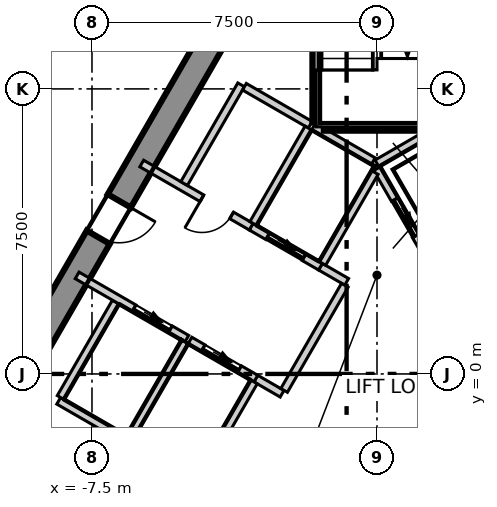
"""IFC4 building model, lengths in metres.
Left out: names, types, materials, properties, quantities, classifications, styles, units other than length and angle.
Written with IfcOpenShell. Run it as: python <this file> out.ifc"""

import sys

from ifc_helpers import new_model, si_unit, direction, frame, frame_2d, origin, place, context, subcontext, project, spatial, polyline, rectangle, outline, extrude, element, fill, save


model = new_model("IFC4")
c1 = context("Model", 3, precision=1e-05, world=origin(), true_north=direction((0.0, 1.0)))
c2 = subcontext(c1, "Body", "Model", "MODEL_VIEW")
j1 = project(units=[si_unit("LENGTHUNIT", "METRE"), si_unit("PLANEANGLEUNIT", "RADIAN")], contexts=[c1])
p1 = place(None, origin())
s1 = spatial("IfcSite", under=j1, at=p1, CompositionType="ELEMENT")
p2 = place(p1, origin())
s2 = spatial("IfcBuilding", under=s1, at=p2, CompositionType="ELEMENT")
p3 = place(p2, frame((0.0, 0.0, 203.3)))
s3 = spatial("IfcBuildingStorey", under=s2, at=p3, CompositionType="ELEMENT", Elevation=203.3)
p4 = place(p3, frame((-1.703, 13.35, -0.3), z_axis=(0.0, 0.0, 1.0), x_axis=(-0.500011533395, -0.866018744874, 0.0)))
e1 = element("IfcWall", 1, at=p4, inside=s3, PredefinedType="SHEAR", context=c2, shape_type="SweptSolid", body=[
    extrude(outline(polyline([(-0.202, -0.35), (1.782, -0.35), (3.766, -0.35), (5.75, -0.35), (7.734, -0.35), (9.718, -0.35), (11.702, -0.35), (13.686, -0.35), (15.67, -0.35), (17.654, -0.35), (19.638, -0.35), (21.622, -0.35), (21.218, 0.35), (19.307, 0.35), (17.397, 0.35), (15.486, 0.35), (13.576, 0.35), (11.665, 0.35), (9.755, 0.35), (7.844, 0.35), (5.934, 0.35), (4.023, 0.35), (2.113, 0.35), (0.202, 0.35), (-0.202, -0.35)])), origin(), (0.0, 0.0, 1.0), 4.0),
])
p5 = place(p4, frame((10.16, 0.0, 0.3)))
e2 = element("IfcOpeningElement", 2, at=p5, cuts=e1, PredefinedType="OPENING", context=c2, shape_type="SweptSolid", body=[
    extrude(rectangle(XDim=1.1, YDim=2.1, at=frame_2d((0.55, 1.05))), frame((0.0, 0.36, 0.0), z_axis=(0.0, -1.0, 0.0), x_axis=(1.0, 0.0, 0.0)), (0.0, 0.0, 1.0), 0.72),
])
p6 = place(p4, frame((4.055, 0.0, 0.3)))
e3 = element("IfcOpeningElement", 3, at=p6, cuts=e1, PredefinedType="OPENING", context=c2, shape_type="SweptSolid", body=[
    extrude(rectangle(XDim=0.9, YDim=2.1, at=frame_2d((0.45, 1.05))), frame((0.0, 0.36, 0.0), z_axis=(0.0, -1.0, 0.0), x_axis=(1.0, 0.0, 0.0)), (0.0, 0.0, 1.0), 0.72),
])
p7 = place(p3, frame((-2.824, 31.513, 0.0), z_axis=(0.0, 0.0, 1.0), x_axis=(-0.500012324412, -0.866018288165, 0.0)))
e4 = element("IfcWall", 4, at=p7, inside=s3, PredefinedType="ELEMENTEDWALL", context=c2, shape_type="SweptSolid", body=[
    extrude(rectangle(XDim=51.739, YDim=0.2, at=frame_2d((25.87, 0.0))), origin(), (0.0, 0.0, 1.0), 3.7),
])
p8 = place(p7, frame((2.275, 0.0, 0.9)))
e5 = element("IfcOpeningElement", 5, at=p8, cuts=e4, PredefinedType="OPENING", context=c2, shape_type="SweptSolid", body=[
    extrude(rectangle(XDim=4.2, YDim=2.5, at=frame_2d((2.1, 1.25))), frame((0.0, 0.11, 0.0), z_axis=(0.0, -1.0, 0.0), x_axis=(1.0, 0.0, 0.0)), (0.0, 0.0, 1.0), 0.22),
])
p9 = place(p7, frame((8.419, 0.0, 0.9)))
e6 = element("IfcOpeningElement", 6, at=p9, cuts=e4, PredefinedType="OPENING", context=c2, shape_type="SweptSolid", body=[
    extrude(rectangle(XDim=4.2, YDim=2.5, at=frame_2d((2.1, 1.25))), frame((0.0, 0.11, 0.0), z_axis=(0.0, -1.0, 0.0), x_axis=(1.0, 0.0, 0.0)), (0.0, 0.0, 1.0), 0.22),
])
p10 = place(p7, frame((14.563, 0.0, 0.9)))
e7 = element("IfcOpeningElement", 7, at=p10, cuts=e4, PredefinedType="OPENING", context=c2, shape_type="SweptSolid", body=[
    extrude(rectangle(XDim=4.2, YDim=2.5, at=frame_2d((2.1, 1.25))), frame((0.0, 0.11, 0.0), z_axis=(0.0, -1.0, 0.0), x_axis=(1.0, 0.0, 0.0)), (0.0, 0.0, 1.0), 0.22),
])
p11 = place(p7, frame((20.707, 0.0, 0.9)))
e8 = element("IfcOpeningElement", 8, at=p11, cuts=e4, PredefinedType="OPENING", context=c2, shape_type="SweptSolid", body=[
    extrude(rectangle(XDim=4.2, YDim=2.5, at=frame_2d((2.1, 1.25))), frame((0.0, 0.11, 0.0), z_axis=(0.0, -1.0, 0.0), x_axis=(1.0, 0.0, 0.0)), (0.0, 0.0, 1.0), 0.22),
])
p12 = place(p7, frame((26.851, 0.0, 0.9)))
e9 = element("IfcOpeningElement", 9, at=p12, cuts=e4, PredefinedType="OPENING", context=c2, shape_type="SweptSolid", body=[
    extrude(rectangle(XDim=4.2, YDim=2.5, at=frame_2d((2.1, 1.25))), frame((0.0, 0.11, 0.0), z_axis=(0.0, -1.0, 0.0), x_axis=(1.0, 0.0, 0.0)), (0.0, 0.0, 1.0), 0.22),
])
p13 = place(p7, frame((32.995, 0.0, 0.9)))
e10 = element("IfcOpeningElement", 10, at=p13, cuts=e4, PredefinedType="OPENING", context=c2, shape_type="SweptSolid", body=[
    extrude(rectangle(XDim=4.2, YDim=2.5, at=frame_2d((2.1, 1.25))), frame((0.0, 0.11, 0.0), z_axis=(0.0, -1.0, 0.0), x_axis=(1.0, 0.0, 0.0)), (0.0, 0.0, 1.0), 0.22),
])
p14 = place(p7, frame((39.14, 0.0, 0.9)))
e11 = element("IfcOpeningElement", 11, at=p14, cuts=e4, PredefinedType="OPENING", context=c2, shape_type="SweptSolid", body=[
    extrude(rectangle(XDim=4.2, YDim=2.5, at=frame_2d((2.1, 1.25))), frame((0.0, 0.11, 0.0), z_axis=(0.0, -1.0, 0.0), x_axis=(1.0, 0.0, 0.0)), (0.0, 0.0, 1.0), 0.22),
])
p15 = place(p7, frame((45.284, 0.0, 0.9)))
e12 = element("IfcOpeningElement", 12, at=p15, cuts=e4, PredefinedType="OPENING", context=c2, shape_type="SweptSolid", body=[
    extrude(rectangle(XDim=4.2, YDim=2.5, at=frame_2d((2.1, 1.25))), frame((0.0, 0.11, 0.0), z_axis=(0.0, -1.0, 0.0), x_axis=(1.0, 0.0, 0.0)), (0.0, 0.0, 1.0), 0.22),
])
p16 = place(p3, frame((-20.883, -11.97, 0.0), z_axis=(0.0, 0.0, 1.0), x_axis=(0.500006150555, 0.866021852731, 0.0)))
e13 = element("IfcWall", 13, at=p16, inside=s3, PredefinedType="PARTITIONING", context=c2, shape_type="SweptSolid", body=[
    extrude(rectangle(XDim=41.766, YDim=0.15, at=frame_2d((20.883, 0.0))), origin(), (0.0, 0.0, 1.0), 3.7),
])
p17 = place(p16, frame((36.916, 0.0, 0.0)))
e14 = element("IfcOpeningElement", 14, at=p17, cuts=e13, PredefinedType="OPENING", context=c2, shape_type="SweptSolid", body=[
    extrude(rectangle(XDim=1.1, YDim=2.1, at=frame_2d((0.55, 1.05))), frame((0.0, 0.085, 0.0), z_axis=(0.0, -1.0, 0.0), x_axis=(1.0, 0.0, 0.0)), (0.0, 0.0, 1.0), 0.17),
])
p18 = place(p16, frame((26.446, 0.0, 0.0)))
e15 = element("IfcOpeningElement", 15, at=p18, cuts=e13, PredefinedType="OPENING", context=c2, shape_type="SweptSolid", body=[
    extrude(rectangle(XDim=1.1, YDim=2.1, at=frame_2d((0.55, 1.05))), frame((0.0, 0.085, 0.0), z_axis=(0.0, -1.0, 0.0), x_axis=(1.0, 0.0, 0.0)), (0.0, 0.0, 1.0), 0.17),
])
p19 = place(p16, frame((9.757, 0.0, 0.0)))
e16 = element("IfcOpeningElement", 16, at=p19, cuts=e13, PredefinedType="OPENING", context=c2, shape_type="SweptSolid", body=[
    extrude(rectangle(XDim=1.1, YDim=2.1, at=frame_2d((0.55, 1.05))), frame((0.0, 0.085, 0.0), z_axis=(0.0, -1.0, 0.0), x_axis=(1.0, 0.0, 0.0)), (0.0, 0.0, 1.0), 0.17),
])
p20 = place(p16, frame((18.757, 0.0, 0.0)))
e17 = element("IfcOpeningElement", 17, at=p20, cuts=e13, PredefinedType="OPENING", context=c2, shape_type="SweptSolid", body=[
    extrude(rectangle(XDim=0.9, YDim=2.1, at=frame_2d((0.45, 1.05))), frame((0.0, 0.085, 0.0), z_axis=(0.0, -1.0, 0.0), x_axis=(1.0, 0.0, 0.0)), (0.0, 0.0, 1.0), 0.17),
])
p21 = place(p16, frame((15.557, 0.0, 0.0)))
e18 = element("IfcOpeningElement", 18, at=p21, cuts=e13, PredefinedType="OPENING", context=c2, shape_type="SweptSolid", body=[
    extrude(rectangle(XDim=0.9, YDim=2.1, at=frame_2d((0.45, 1.05))), frame((0.0, 0.085, 0.0), z_axis=(0.0, -1.0, 0.0), x_axis=(1.0, 0.0, 0.0)), (0.0, 0.0, 1.0), 0.17),
])
p22 = place(p16, frame((12.657, 0.0, 0.0)))
e19 = element("IfcOpeningElement", 19, at=p22, cuts=e13, PredefinedType="OPENING", context=c2, shape_type="SweptSolid", body=[
    extrude(rectangle(XDim=1.0, YDim=2.1, at=frame_2d((0.5, 1.05))), frame((0.0, 0.085, 0.0), z_axis=(0.0, -1.0, 0.0), x_axis=(1.0, 0.0, 0.0)), (0.0, 0.0, 1.0), 0.17),
])
p23 = place(p16, frame((3.669, 0.0, 0.0)))
e20 = element("IfcOpeningElement", 20, at=p23, cuts=e13, PredefinedType="OPENING", context=c2, shape_type="SweptSolid", body=[
    extrude(rectangle(XDim=1.1, YDim=2.1, at=frame_2d((0.55, 1.05))), frame((0.0, 0.085, 0.0), z_axis=(0.0, -1.0, 0.0), x_axis=(1.0, 0.0, 0.0)), (0.0, 0.0, 1.0), 0.17),
])
p24 = place(p3, frame((0.075, 24.07, 0.0), z_axis=(0.0, 0.0, 1.0), x_axis=(0.500006834213, -0.866021458014, 0.0)))
e21 = element("IfcWall", 21, at=p24, inside=s3, PredefinedType="PARTITIONING", context=c2, shape_type="SweptSolid", body=[
    extrude(rectangle(XDim=41.616, YDim=0.15, at=frame_2d((20.808, 0.0))), origin(), (0.0, 0.0, 1.0), 3.7),
])
p25 = place(p24, frame((36.915, 0.0, 0.0)))
e22 = element("IfcOpeningElement", 22, at=p25, cuts=e21, PredefinedType="OPENING", context=c2, shape_type="SweptSolid", body=[
    extrude(rectangle(XDim=1.1, YDim=2.1, at=frame_2d((0.55, 1.05))), frame((0.0, 0.085, 0.0), z_axis=(0.0, -1.0, 0.0), x_axis=(1.0, 0.0, 0.0)), (0.0, 0.0, 1.0), 0.17),
])
p26 = place(p24, frame((22.046, 0.0, 0.0)))
e23 = element("IfcOpeningElement", 23, at=p26, cuts=e21, PredefinedType="OPENING", context=c2, shape_type="SweptSolid", body=[
    extrude(rectangle(XDim=1.1, YDim=2.1, at=frame_2d((0.55, 1.05))), frame((0.0, 0.085, 0.0), z_axis=(0.0, -1.0, 0.0), x_axis=(1.0, 0.0, 0.0)), (0.0, 0.0, 1.0), 0.17),
])
p27 = place(p24, frame((31.046, 0.0, 0.0)))
e24 = element("IfcOpeningElement", 24, at=p27, cuts=e21, PredefinedType="OPENING", context=c2, shape_type="SweptSolid", body=[
    extrude(rectangle(XDim=0.9, YDim=2.1, at=frame_2d((0.45, 1.05))), frame((0.0, 0.085, 0.0), z_axis=(0.0, -1.0, 0.0), x_axis=(1.0, 0.0, 0.0)), (0.0, 0.0, 1.0), 0.17),
])
p28 = place(p24, frame((27.846, 0.0, 0.0)))
e25 = element("IfcOpeningElement", 25, at=p28, cuts=e21, PredefinedType="OPENING", context=c2, shape_type="SweptSolid", body=[
    extrude(rectangle(XDim=0.9, YDim=2.1, at=frame_2d((0.45, 1.05))), frame((0.0, 0.085, 0.0), z_axis=(0.0, -1.0, 0.0), x_axis=(1.0, 0.0, 0.0)), (0.0, 0.0, 1.0), 0.17),
])
p29 = place(p24, frame((24.946, 0.0, 0.0)))
e26 = element("IfcOpeningElement", 26, at=p29, cuts=e21, PredefinedType="OPENING", context=c2, shape_type="SweptSolid", body=[
    extrude(rectangle(XDim=1.0, YDim=2.1, at=frame_2d((0.5, 1.05))), frame((0.0, 0.085, 0.0), z_axis=(0.0, -1.0, 0.0), x_axis=(1.0, 0.0, 0.0)), (0.0, 0.0, 1.0), 0.17),
])
p30 = place(p24, frame((17.258, 0.0, 0.0)))
e27 = element("IfcOpeningElement", 27, at=p30, cuts=e21, PredefinedType="OPENING", context=c2, shape_type="SweptSolid", body=[
    extrude(rectangle(XDim=1.0, YDim=2.1, at=frame_2d((0.5, 1.05))), frame((0.0, 0.085, 0.0), z_axis=(0.0, -1.0, 0.0), x_axis=(1.0, 0.0, 0.0)), (0.0, 0.0, 1.0), 0.17),
])
p31 = place(p24, frame((11.114, 0.0, 0.0)))
e28 = element("IfcOpeningElement", 28, at=p31, cuts=e21, PredefinedType="OPENING", context=c2, shape_type="SweptSolid", body=[
    extrude(rectangle(XDim=1.0, YDim=2.1, at=frame_2d((0.5, 1.05))), frame((0.0, 0.085, 0.0), z_axis=(0.0, -1.0, 0.0), x_axis=(1.0, 0.0, 0.0)), (0.0, 0.0, 1.0), 0.17),
])
p32 = place(p24, frame((3.669, 0.0, 0.0)))
e29 = element("IfcOpeningElement", 29, at=p32, cuts=e21, PredefinedType="OPENING", context=c2, shape_type="SweptSolid", body=[
    extrude(rectangle(XDim=1.0, YDim=2.1, at=frame_2d((0.5, 1.05))), frame((0.0, 0.085, 0.0), z_axis=(0.0, -1.0, 0.0), x_axis=(1.0, 0.0, 0.0)), (0.0, 0.0, 1.0), 0.17),
])
p33 = place(p3, frame((-12.82, 7.488, 0.0), z_axis=(0.0, 0.0, 1.0), x_axis=(0.500060781096, 0.865990308958, 0.0)))
e30 = element("IfcWall", 30, at=p33, inside=s3, PredefinedType="PARTITIONING", context=c2, shape_type="SweptSolid", body=[
    extrude(rectangle(XDim=12.139, YDim=0.15, at=frame_2d((6.069, 0.0))), origin(), (0.0, 0.0, 1.0), 3.7),
])
p34 = place(p33, frame((5.564, 0.0, 0.0)))
e31 = element("IfcOpeningElement", 31, at=p34, cuts=e30, PredefinedType="OPENING", context=c2, shape_type="SweptSolid", body=[
    extrude(rectangle(XDim=1.0, YDim=2.1, at=frame_2d((0.5, 1.05))), frame((0.0, 0.085, 0.0), z_axis=(0.0, -1.0, 0.0), x_axis=(1.0, 0.0, 0.0)), (0.0, 0.0, 1.0), 0.17),
])
p35 = place(p3, frame((-8.376, -0.707, 0.0), z_axis=(0.0, 0.0, 1.0), x_axis=(0.866067520717, -0.499927044236, 0.0)))
e32 = element("IfcWall", 32, at=p35, inside=s3, PredefinedType="SOLIDWALL", context=c2, shape_type="SweptSolid", body=[
    extrude(rectangle(XDim=2.1, YDim=0.2, at=frame_2d((1.05, 0.0))), origin(), (0.0, 0.0, 1.0), 3.7),
])
p36 = place(p3, frame((-8.326, -0.62, 0.0), z_axis=(0.0, 0.0, 1.0), x_axis=(0.500023687443, 0.866011727401, 0.0)))
e33 = element("IfcWall", 33, at=p36, inside=s3, PredefinedType="SOLIDWALL", context=c2, shape_type="SweptSolid", body=[
    extrude(rectangle(XDim=2.9, YDim=0.2, at=frame_2d((1.45, 0.0))), origin(), (0.0, 0.0, 1.0), 3.7),
])
p37 = place(p3, frame((-0.002, 5.541, 0.0), z_axis=(0.0, 0.0, 1.0), x_axis=(0.86600155993, 0.500041296494, 0.0)))
e34 = element("IfcWall", 34, at=p37, inside=s3, PredefinedType="SOLIDWALL", context=c2, shape_type="SweptSolid", body=[
    extrude(rectangle(XDim=4.132, YDim=0.2, at=frame_2d((2.066, 0.0))), origin(), (0.0, 0.0, 1.0), 3.7),
])
p38 = place(p3, frame((0.0, 5.4, 0.0), z_axis=(0.0, 0.0, 1.0), x_axis=(0.500103862429, -0.865965430478, 0.0)))
e35 = element("IfcWall", 35, at=p38, inside=s3, PredefinedType="SOLIDWALL", context=c2, shape_type="SweptSolid", body=[
    extrude(rectangle(XDim=2.973, YDim=0.2, at=frame_2d((1.487, 0.0))), origin(), (0.0, 0.0, 1.0), 3.7),
])
p39 = place(p38, frame((0.937, 0.0, 0.0)))
e36 = element("IfcOpeningElement", 36, at=p39, cuts=e35, PredefinedType="OPENING", context=c2, shape_type="SweptSolid", body=[
    extrude(rectangle(XDim=1.1, YDim=2.1, at=frame_2d((0.55, 1.05))), frame((0.0, 0.11, 0.0), z_axis=(0.0, -1.0, 0.0), x_axis=(1.0, 0.0, 0.0)), (0.0, 0.0, 1.0), 0.22),
])
p40 = place(p3, frame((-7.891, 2.593, 0.0), z_axis=(0.0, 0.0, 1.0), x_axis=(0.866070917804, -0.499921159118, 0.0)))
e37 = element("IfcWall", 37, at=p40, inside=s3, PredefinedType="SOLIDWALL", context=c2, shape_type="SweptSolid", body=[
    extrude(rectangle(XDim=3.333, YDim=0.2, at=frame_2d((1.666, 0.0))), origin(), (0.0, 0.0, 1.0), 3.7),
])
p41 = place(p40, frame((1.73, 0.0, 0.0)))
e38 = element("IfcOpeningElement", 38, at=p41, cuts=e37, PredefinedType="OPENING", context=c2, shape_type="SweptSolid", body=[
    extrude(rectangle(XDim=1.1, YDim=2.1, at=frame_2d((0.55, 1.05))), frame((0.0, 0.11, 0.0), z_axis=(0.0, -1.0, 0.0), x_axis=(1.0, 0.0, 0.0)), (0.0, 0.0, 1.0), 0.22),
])
p42 = place(p3, frame((-3.188, -0.122, 0.0), z_axis=(0.0, 0.0, 1.0), x_axis=(0.865705793592, -0.50055317294, 0.0)))
e39 = element("IfcWall", 39, at=p42, inside=s3, PredefinedType="SOLIDWALL", context=c2, shape_type="SweptSolid", body=[
    extrude(rectangle(XDim=0.797, YDim=0.2, at=frame_2d((0.398, 0.0))), origin(), (0.0, 0.0, 1.0), 3.7),
])
p43 = place(p3, frame((-6.191, 5.537, 0.0), z_axis=(0.0, 0.0, 1.0), x_axis=(0.866052607023, -0.499952879648, 0.0)))
e40 = element("IfcWall", 40, at=p43, inside=s3, PredefinedType="SOLIDWALL", context=c2, shape_type="SweptSolid", body=[
    extrude(rectangle(XDim=3.332, YDim=0.2, at=frame_2d((1.666, 0.0))), origin(), (0.0, 0.0, 1.0), 3.7),
])
p44 = place(p43, frame((1.83, 0.0, 0.0)))
e41 = element("IfcOpeningElement", 41, at=p44, cuts=e40, PredefinedType="OPENING", context=c2, shape_type="SweptSolid", body=[
    extrude(rectangle(XDim=0.9, YDim=2.1, at=frame_2d((0.45, 1.05))), frame((0.0, 0.11, 0.0), z_axis=(0.0, -1.0, 0.0), x_axis=(1.0, 0.0, 0.0)), (0.0, 0.0, 1.0), 0.22),
])
p45 = place(p3, frame((-1.488, 2.822, 0.0), z_axis=(0.0, 0.0, 1.0), x_axis=(0.866236612152, -0.499633997809, 0.0)))
e42 = element("IfcWall", 42, at=p45, inside=s3, PredefinedType="SOLIDWALL", context=c2, shape_type="SweptSolid", body=[
    extrude(rectangle(XDim=0.796, YDim=0.2, at=frame_2d((0.398, 0.0))), origin(), (0.0, 0.0, 1.0), 3.7),
])
p46 = place(p3, frame((-5.076, 5.009, 0.0), z_axis=(0.0, 0.0, 1.0), x_axis=(0.50002537861, 0.866010750942, 0.0)))
e43 = element("IfcWall", 43, at=p46, inside=s3, PredefinedType="SOLIDWALL", context=c2, shape_type="SweptSolid", body=[
    extrude(rectangle(XDim=3.0, YDim=0.2, at=frame_2d((1.5, 0.0))), origin(), (0.0, 0.0, 1.0), 3.7),
])
p47 = place(p3, frame((-3.489, 7.557, 0.0), z_axis=(0.0, 0.0, 1.0), x_axis=(0.866010750942, -0.50002537861, 0.0)))
e44 = element("IfcWall", 44, at=p47, inside=s3, PredefinedType="SOLIDWALL", context=c2, shape_type="SweptSolid", body=[
    extrude(rectangle(XDim=2.0, YDim=0.2, at=frame_2d((1.0, 0.0))), origin(), (0.0, 0.0, 1.0), 3.7),
])
p48 = place(p3, frame((-2.444, -0.433, 0.0), z_axis=(0.0, 0.0, 1.0), x_axis=(0.500035624827, 0.866004834804, 0.0)))
e45 = element("IfcWall", 45, at=p48, inside=s3, PredefinedType="SOLIDWALL", context=c2, shape_type="SweptSolid", body=[
    extrude(rectangle(XDim=3.194, YDim=0.2, at=frame_2d((1.597, 0.0))), origin(), (0.0, 0.0, 1.0), 3.7),
])
p49 = place(p3, frame((-6.507, -1.67, 0.0), z_axis=(0.0, 0.0, 1.0), x_axis=(0.50012328804, 0.865954211699, 0.0)))
e46 = element("IfcWall", 46, at=p49, inside=s3, PredefinedType="SOLIDWALL", context=c2, shape_type="SweptSolid", body=[
    extrude(rectangle(XDim=2.9, YDim=0.2, at=frame_2d((1.45, 0.0))), origin(), (0.0, 0.0, 1.0), 3.7),
])
p50 = place(p3, frame((-4.922, 0.879, 0.0), z_axis=(0.0, 0.0, 1.0), x_axis=(0.866073918653, -0.499915960366, 0.0)))
e47 = element("IfcWall", 47, at=p50, inside=s3, PredefinedType="SOLIDWALL", context=c2, shape_type="SweptSolid", body=[
    extrude(rectangle(XDim=2.002, YDim=0.2, at=frame_2d((1.001, 0.0))), origin(), (0.0, 0.0, 1.0), 3.7),
])
p51 = place(p50, frame((0.402, 0.0, 0.0)))
e48 = element("IfcOpeningElement", 48, at=p51, cuts=e47, PredefinedType="OPENING", context=c2, shape_type="SweptSolid", body=[
    extrude(rectangle(XDim=1.1, YDim=2.1, at=frame_2d((0.55, 1.05))), frame((0.0, 0.11, 0.0), z_axis=(0.0, -1.0, 0.0), x_axis=(1.0, 0.0, 0.0)), (0.0, 0.0, 1.0), 0.22),
])
p52 = place(p3, frame((-4.619, -2.6, 0.0), z_axis=(0.0, 0.0, 1.0), x_axis=(0.50009492287, 0.865970593103, 0.0)))
e49 = element("IfcWall", 49, at=p52, inside=s3, PredefinedType="SOLIDWALL", context=c2, shape_type="SweptSolid", body=[
    extrude(rectangle(XDim=2.761, YDim=0.2, at=frame_2d((1.381, 0.0))), origin(), (0.0, 0.0, 1.0), 3.7),
])
p53 = place(p3, frame((-3.309, 3.873, 0.0), z_axis=(0.0, 0.0, 1.0), x_axis=(0.866098583652, -0.499873227325, 0.0)))
e50 = element("IfcWall", 50, at=p53, inside=s3, PredefinedType="SOLIDWALL", context=c2, shape_type="SweptSolid", body=[
    extrude(rectangle(XDim=2.103, YDim=0.2, at=frame_2d((1.051, 0.0))), origin(), (0.0, 0.0, 1.0), 3.7),
])
p54 = place(p53, frame((0.502, 0.0, 0.0)))
e51 = element("IfcOpeningElement", 51, at=p54, cuts=e50, PredefinedType="OPENING", context=c2, shape_type="SweptSolid", body=[
    extrude(rectangle(XDim=1.1, YDim=2.1, at=frame_2d((0.55, 1.05))), frame((0.0, 0.11, 0.0), z_axis=(0.0, -1.0, 0.0), x_axis=(1.0, 0.0, 0.0)), (0.0, 0.0, 1.0), 0.22),
])
p55 = place(p3, frame((-3.257, 3.959, 0.0), z_axis=(0.0, 0.0, 1.0), x_axis=(0.50012328804, 0.865954211699, 0.0)))
e52 = element("IfcWall", 52, at=p55, inside=s3, PredefinedType="SOLIDWALL", context=c2, shape_type="SweptSolid", body=[
    extrude(rectangle(XDim=2.9, YDim=0.2, at=frame_2d((1.45, 0.0))), origin(), (0.0, 0.0, 1.0), 3.7),
])
p56 = place(p3, frame((-1.67, 6.507, 0.0), z_axis=(0.0, 0.0, 1.0), x_axis=(0.865941441609, -0.500145398563, 0.0)))
e53 = element("IfcWall", 53, at=p56, inside=s3, PredefinedType="SOLIDWALL", context=c2, shape_type="SweptSolid", body=[
    extrude(rectangle(XDim=1.815, YDim=0.2, at=frame_2d((0.908, 0.0))), origin(), (0.0, 0.0, 1.0), 3.7),
])
p57 = place(p3, frame((-1.438, 2.909, 0.0), z_axis=(0.0, 0.0, 1.0), x_axis=(0.499829630636, 0.866123744241, 0.0)))
e54 = element("IfcWall", 54, at=p57, inside=s3, PredefinedType="SOLIDWALL", context=c2, shape_type="SweptSolid", body=[
    extrude(rectangle(XDim=2.761, YDim=0.2, at=frame_2d((1.38, 0.0))), origin(), (0.0, 0.0, 1.0), 3.7),
])
p58 = place(p3, frame((-1.4, 6.5, 0.0), z_axis=(0.0, 0.0, 1.0), x_axis=(1.0, 0.0, 0.0)))
e55 = element("IfcWall", 55, at=p58, inside=s3, PredefinedType="SOLIDWALL", context=c2, shape_type="SweptSolid", body=[
    extrude(rectangle(XDim=2.8, YDim=0.2, at=frame_2d((1.4, 0.0))), origin(), (0.0, 0.0, 1.0), 3.7),
])
p59 = place(p3, frame((-1.6, 6.615, 0.0), z_axis=(0.0, 0.0, 1.0), x_axis=(0.0, 1.0, 0.0)))
e56 = element("IfcWall", 56, at=p59, inside=s3, PredefinedType="SOLIDWALL", context=c2, shape_type="SweptSolid", body=[
    extrude(rectangle(XDim=6.715, YDim=0.2, at=frame_2d((3.357, 0.0))), origin(), (0.0, 0.0, 1.0), 3.7),
])
p60 = place(p39, origin())
e57 = element("IfcDoor", 57, at=p60, inside=s3, OperationType="SLIDING_TO_LEFT", PredefinedType="DOOR", context=c2, shape_type="SweptSolid", body=[
    extrude(rectangle(XDim=1.1, YDim=2.1, at=frame_2d((0.55, 1.05))), frame((0.0, 0.025, 0.0), z_axis=(0.0, -1.0, 0.0), x_axis=(1.0, 0.0, 0.0)), (0.0, 0.0, 1.0), 0.05),
])
fill(e36, e57)
p61 = place(p51, origin())
e58 = element("IfcDoor", 58, at=p61, inside=s3, OperationType="SLIDING_TO_LEFT", PredefinedType="DOOR", context=c2, shape_type="SweptSolid", body=[
    extrude(rectangle(XDim=1.1, YDim=2.1, at=frame_2d((0.55, 1.05))), frame((0.0, 0.025, 0.0), z_axis=(0.0, -1.0, 0.0), x_axis=(1.0, 0.0, 0.0)), (0.0, 0.0, 1.0), 0.05),
])
fill(e48, e58)
p62 = place(p54, origin())
e59 = element("IfcDoor", 59, at=p62, inside=s3, OperationType="SLIDING_TO_LEFT", PredefinedType="DOOR", context=c2, shape_type="SweptSolid", body=[
    extrude(rectangle(XDim=1.1, YDim=2.1, at=frame_2d((0.55, 1.05))), frame((0.0, 0.025, 0.0), z_axis=(0.0, -1.0, 0.0), x_axis=(1.0, 0.0, 0.0)), (0.0, 0.0, 1.0), 0.05),
])
fill(e51, e59)
p63 = place(p41, origin())
e60 = element("IfcDoor", 60, at=p63, inside=s3, OperationType="SLIDING_TO_LEFT", PredefinedType="DOOR", context=c2, shape_type="SweptSolid", body=[
    extrude(rectangle(XDim=1.1, YDim=2.1, at=frame_2d((0.55, 1.05))), frame((0.0, 0.025, 0.0), z_axis=(0.0, -1.0, 0.0), x_axis=(1.0, 0.0, 0.0)), (0.0, 0.0, 1.0), 0.05),
])
fill(e38, e60)
p64 = place(p44, origin())
e61 = element("IfcDoor", 61, at=p64, inside=s3, OperationType="SINGLE_SWING_LEFT", PredefinedType="DOOR", context=c2, shape_type="SweptSolid", body=[
    extrude(rectangle(XDim=0.9, YDim=2.1, at=frame_2d((0.45, 1.05))), frame((0.0, 0.025, 0.0), z_axis=(0.0, -1.0, 0.0), x_axis=(1.0, 0.0, 0.0)), (0.0, 0.0, 1.0), 0.05),
])
fill(e41, e61)
p65 = place(p5, origin())
e62 = element("IfcDoor", 62, at=p65, inside=s3, OperationType="SINGLE_SWING_RIGHT", PredefinedType="DOOR", context=c2, shape_type="SweptSolid", body=[
    extrude(rectangle(XDim=1.1, YDim=2.1, at=frame_2d((0.55, 1.05))), frame((0.0, 0.025, 0.0), z_axis=(0.0, -1.0, 0.0), x_axis=(1.0, 0.0, 0.0)), (0.0, 0.0, 1.0), 0.05),
])
fill(e2, e62)
save(model, sys.argv[1])
